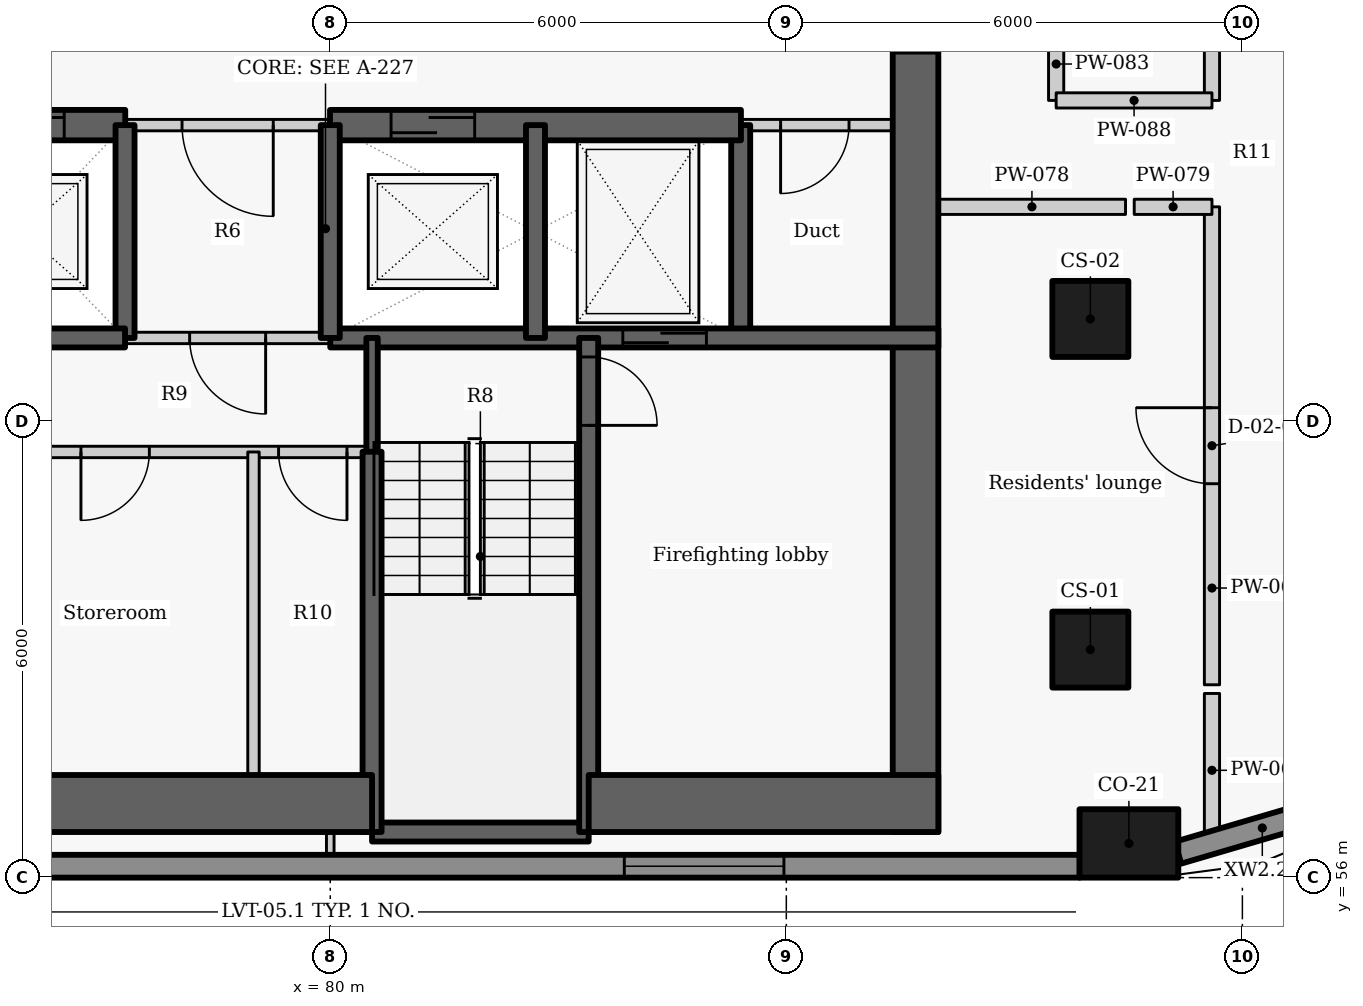
"""IFC4 building model, lengths in metres.
Left out: names, types, materials, properties, quantities, classifications, styles, units other than length and angle.
Written with IfcOpenShell. Run it as: python <this file> out.ifc"""

import sys

from ifc_helpers import new_model, si_unit, direction, frame, frame_2d, origin, origin_2d, place, context, subcontext, project, spatial, rectangle, extrude, element, fill, save


model = new_model("IFC4")
c1 = context("Model", 3, precision=1e-05, world=origin(), true_north=direction((0.0, 1.0)))
c2 = subcontext(c1, "Body", "Model", "MODEL_VIEW")
j1 = project(units=[si_unit("LENGTHUNIT", "METRE"), si_unit("PLANEANGLEUNIT", "RADIAN")], contexts=[c1])
p1 = place(None, origin())
s1 = spatial("IfcSite", under=j1, at=p1, CompositionType="ELEMENT")
p2 = place(p1, origin())
s2 = spatial("IfcBuilding", under=s1, at=p2, CompositionType="ELEMENT")
p3 = place(p2, frame((0.0, 0.0, 150.3)))
s3 = spatial("IfcBuildingStorey", under=s2, at=p3, CompositionType="ELEMENT", Elevation=150.3)
p4 = place(p3, frame((90.507, 56.45, 0.0), z_axis=(0.0, 0.0, 1.0), x_axis=(1.0, 0.0, 0.0)))
e1 = element("IfcColumn", 1, at=p4, inside=s3, PredefinedType="COLUMN", context=c2, shape_type="SweptSolid", body=[
    extrude(rectangle(XDim=1.3, YDim=0.9, at=origin_2d()), origin(), (0.0, 0.0, 1.0), 3.3),
])
for number, where, z_axis, x_axis in (
    (2, (90.0, 59.0, 0.0), (0.0, 0.0, 1.0), (0.0, 1.0, 0.0)),
    (3, (90.0, 63.35, 0.0), (0.0, 0.0, 1.0), (0.0, 1.0, 0.0)),
):
    element("IfcColumn", number, at=place(p3, frame(where, z_axis=z_axis, x_axis=x_axis)), inside=s3, PredefinedType="COLUMN", context=c2, shape_type="SweptSolid", body=[
        extrude(rectangle(XDim=1.0, YDim=1.0, at=origin_2d()), origin(), (0.0, 0.0, 1.0), 3.3),
    ])
p5 = place(p3, frame((69.821, 56.15, 0.0), z_axis=(0.0, 0.0, 1.0), x_axis=(1.0, 0.0, 0.0)))
e4 = element("IfcWall", 4, at=p5, inside=s3, PredefinedType="SOLIDWALL", context=c2, shape_type="SweptSolid", body=[
    extrude(rectangle(XDim=20.04, YDim=0.3, at=frame_2d((10.02, 0.0))), origin(), (0.0, 0.0, 1.0), 2.425),
])
p6 = place(p5, frame((4.051, 0.0, 0.9)))
e5 = element("IfcOpeningElement", 5, at=p6, cuts=e4, PredefinedType="OPENING", context=c2, shape_type="SweptSolid", body=[
    extrude(rectangle(XDim=2.1, YDim=1.1, at=frame_2d((1.05, 0.55))), frame((0.0, 0.16, 0.0), z_axis=(0.0, -1.0, 0.0), x_axis=(1.0, 0.0, 0.0)), (0.0, 0.0, 1.0), 0.32),
])
p7 = place(p5, frame((14.047, 0.0, 0.9)))
e6 = element("IfcOpeningElement", 6, at=p7, cuts=e4, PredefinedType="OPENING", context=c2, shape_type="SweptSolid", body=[
    extrude(rectangle(XDim=2.1, YDim=1.1, at=frame_2d((1.05, 0.55))), frame((0.0, 0.16, 0.0), z_axis=(0.0, -1.0, 0.0), x_axis=(1.0, 0.0, 0.0)), (0.0, 0.0, 1.0), 0.32),
])
p8 = place(p3, frame((91.153, 56.328, 0.0), z_axis=(0.0, 0.0, 1.0), x_axis=(0.959473072336, 0.281800325517, 0.0)))
e7 = element("IfcWall", 7, at=p8, inside=s3, PredefinedType="SOLIDWALL", context=c2, shape_type="SweptSolid", body=[
    extrude(rectangle(XDim=2.312, YDim=0.3, at=frame_2d((1.156, 0.0))), origin(), (0.0, 0.0, 1.0), 2.425),
])
p9 = place(p3, frame((85.4, 63.1, -0.275), z_axis=(0.0, 0.0, 1.0), x_axis=(0.0, 1.0, 0.0)))
e8 = element("IfcWall", 8, at=p9, inside=s3, PredefinedType="SHEAR", context=c2, shape_type="SweptSolid", body=[
    extrude(rectangle(XDim=2.8, YDim=0.25, at=frame_2d((1.4, 0.0))), origin(), (0.0, 0.0, 1.0), 3.3),
])
p10 = place(p3, frame((87.7, 72.2, -0.275), z_axis=(0.0, 0.0, 1.0), x_axis=(0.0, -1.0, 0.0)))
e9 = element("IfcWall", 9, at=p10, inside=s3, PredefinedType="SHEAR", context=c2, shape_type="SweptSolid", body=[
    extrude(rectangle(XDim=15.6, YDim=0.6, at=frame_2d((7.8, 0.0))), origin(), (0.0, 0.0, 1.0), 3.3),
])
p11 = place(p10, frame((3.852, 0.0, 0.275)))
e10 = element("IfcOpeningElement", 10, at=p11, cuts=e9, PredefinedType="OPENING", context=c2, shape_type="SweptSolid", body=[
    extrude(rectangle(XDim=1.5, YDim=2.1, at=frame_2d((0.75, 1.05))), frame((0.0, 0.31, 0.0), z_axis=(0.0, -1.0, 0.0), x_axis=(1.0, 0.0, 0.0)), (0.0, 0.0, 1.0), 0.62),
])
p12 = place(p3, frame((80.003, 65.9, 0.0), z_axis=(0.0, 0.0, 1.0), x_axis=(-1.0, 0.0, 0.0)))
e11 = element("IfcWall", 11, at=p12, inside=s3, PredefinedType="PARTITIONING", context=c2, shape_type="SweptSolid", body=[
    extrude(rectangle(XDim=2.706, YDim=0.15, at=frame_2d((1.353, 0.0))), origin(), (0.0, 0.0, 1.0), 3.025),
])
p13 = place(p12, frame((0.753, 0.0, 0.0)))
e12 = element("IfcOpeningElement", 12, at=p13, cuts=e11, PredefinedType="OPENING", context=c2, shape_type="SweptSolid", body=[
    extrude(rectangle(XDim=1.2, YDim=2.1, at=frame_2d((0.6, 1.05))), frame((0.0, 0.085, 0.0), z_axis=(0.0, -1.0, 0.0), x_axis=(1.0, 0.0, 0.0)), (0.0, 0.0, 1.0), 0.17),
])
p14 = place(p3, frame((88.0, 65.9, 0.0), z_axis=(0.0, 0.0, 1.0), x_axis=(-1.0, 0.0, 0.0)))
e13 = element("IfcWall", 13, at=p14, inside=s3, PredefinedType="PARTITIONING", context=c2, shape_type="SweptSolid", body=[
    extrude(rectangle(XDim=2.603, YDim=0.15, at=frame_2d((1.302, 0.0))), origin(), (0.0, 0.0, 1.0), 3.025),
])
p15 = place(p14, frame((1.175, 0.0, 0.0)))
e14 = element("IfcOpeningElement", 14, at=p15, cuts=e13, PredefinedType="OPENING", context=c2, shape_type="SweptSolid", body=[
    extrude(rectangle(XDim=0.9, YDim=2.1, at=frame_2d((0.45, 1.05))), frame((0.0, 0.085, 0.0), z_axis=(0.0, -1.0, 0.0), x_axis=(1.0, 0.0, 0.0)), (0.0, 0.0, 1.0), 0.17),
])
p16 = place(p3, frame((74.597, 65.9, -0.275), z_axis=(0.0, 0.0, 1.0), x_axis=(1.0, 0.0, 0.0)))
e15 = element("IfcWall", 15, at=p16, inside=s3, PredefinedType="SHEAR", context=c2, shape_type="SweptSolid", body=[
    extrude(rectangle(XDim=2.706, YDim=0.4, at=frame_2d((1.353, 0.0))), origin(), (0.0, 0.0, 1.0), 3.3),
])
p17 = place(p16, frame((0.803, 0.0, 0.275)))
e16 = element("IfcOpeningElement", 16, at=p17, cuts=e15, PredefinedType="OPENING", context=c2, shape_type="SweptSolid", body=[
    extrude(rectangle(XDim=1.1, YDim=2.1, at=frame_2d((0.55, 1.05))), frame((0.0, 0.21, 0.0), z_axis=(0.0, -1.0, 0.0), x_axis=(1.0, 0.0, 0.0)), (0.0, 0.0, 1.0), 0.42),
])
p18 = place(p3, frame((79.997, 65.9, -0.275), z_axis=(0.0, 0.0, 1.0), x_axis=(1.0, 0.0, 0.0)))
e17 = element("IfcWall", 17, at=p18, inside=s3, PredefinedType="SHEAR", context=c2, shape_type="SweptSolid", body=[
    extrude(rectangle(XDim=5.406, YDim=0.4, at=frame_2d((2.703, 0.0))), origin(), (0.0, 0.0, 1.0), 3.3),
])
p19 = place(p18, frame((0.803, 0.0, 0.275)))
e18 = element("IfcOpeningElement", 18, at=p19, cuts=e17, PredefinedType="OPENING", context=c2, shape_type="SweptSolid", body=[
    extrude(rectangle(XDim=1.1, YDim=2.1, at=frame_2d((0.55, 1.05))), frame((0.0, 0.21, 0.0), z_axis=(0.0, -1.0, 0.0), x_axis=(1.0, 0.0, 0.0)), (0.0, 0.0, 1.0), 0.42),
])
p20 = place(p3, frame((77.3, 63.1, -0.275), z_axis=(0.0, 0.0, 1.0), x_axis=(0.0, 1.0, 0.0)))
e19 = element("IfcWall", 19, at=p20, inside=s3, PredefinedType="SHEAR", context=c2, shape_type="SweptSolid", body=[
    extrude(rectangle(XDim=2.8, YDim=0.25, at=frame_2d((1.4, 0.0))), origin(), (0.0, 0.0, 1.0), 3.3),
])
p21 = place(p3, frame((74.6, 63.1, -0.275), z_axis=(0.0, 0.0, 1.0), x_axis=(1.0, 0.0, 0.0)))
e20 = element("IfcWall", 20, at=p21, inside=s3, PredefinedType="SHEAR", context=c2, shape_type="SweptSolid", body=[
    extrude(rectangle(XDim=2.7, YDim=0.25, at=frame_2d((1.35, 0.0))), origin(), (0.0, 0.0, 1.0), 3.3),
])
p22 = place(p3, frame((80.0, 63.1, -0.275), z_axis=(0.0, 0.0, 1.0), x_axis=(1.0, 0.0, 0.0)))
e21 = element("IfcWall", 21, at=p22, inside=s3, PredefinedType="SHEAR", context=c2, shape_type="SweptSolid", body=[
    extrude(rectangle(XDim=8.0, YDim=0.25, at=frame_2d((4.0, 0.0))), origin(), (0.0, 0.0, 1.0), 3.3),
])
p23 = place(p22, frame((3.849, 0.0, 0.275)))
e22 = element("IfcOpeningElement", 22, at=p23, cuts=e21, PredefinedType="OPENING", context=c2, shape_type="SweptSolid", body=[
    extrude(rectangle(XDim=1.1, YDim=2.1, at=frame_2d((0.55, 1.05))), frame((0.0, 0.135, 0.0), z_axis=(0.0, -1.0, 0.0), x_axis=(1.0, 0.0, 0.0)), (0.0, 0.0, 1.0), 0.27),
])
p24 = place(p3, frame((80.0, 63.1, -0.275), z_axis=(0.0, 0.0, 1.0), x_axis=(0.0, 1.0, 0.0)))
e23 = element("IfcWall", 23, at=p24, inside=s3, PredefinedType="SHEAR", context=c2, shape_type="SweptSolid", body=[
    extrude(rectangle(XDim=2.8, YDim=0.25, at=frame_2d((1.4, 0.0))), origin(), (0.0, 0.0, 1.0), 3.3),
])
p25 = place(p3, frame((80.0, 63.1, 0.0), z_axis=(0.0, 0.0, 1.0), x_axis=(-1.0, 0.0, 0.0)))
e24 = element("IfcWall", 24, at=p25, inside=s3, PredefinedType="PARTITIONING", context=c2, shape_type="SweptSolid", body=[
    extrude(rectangle(XDim=2.7, YDim=0.15, at=frame_2d((1.35, 0.0))), origin(), (0.0, 0.0, 1.0), 3.025),
])
p26 = place(p25, frame((0.85, 0.0, 0.0)))
e25 = element("IfcOpeningElement", 25, at=p26, cuts=e24, PredefinedType="OPENING", context=c2, shape_type="SweptSolid", body=[
    extrude(rectangle(XDim=1.0, YDim=2.1, at=frame_2d((0.5, 1.05))), frame((0.0, 0.085, 0.0), z_axis=(0.0, -1.0, 0.0), x_axis=(1.0, 0.0, 0.0)), (0.0, 0.0, 1.0), 0.17),
])
p27 = place(p3, frame((82.7, 63.1, -0.275), z_axis=(0.0, 0.0, 1.0), x_axis=(0.0, 1.0, 0.0)))
e26 = element("IfcWall", 26, at=p27, inside=s3, PredefinedType="SHEAR", context=c2, shape_type="SweptSolid", body=[
    extrude(rectangle(XDim=2.8, YDim=0.25, at=frame_2d((1.4, 0.0))), origin(), (0.0, 0.0, 1.0), 3.3),
])
p28 = place(p3, frame((80.55, 56.6, -0.275), z_axis=(0.0, 0.0, 1.0), x_axis=(1.0, 0.0, 0.0)))
e27 = element("IfcWall", 27, at=p28, inside=s3, PredefinedType="SHEAR", context=c2, shape_type="SweptSolid", body=[
    extrude(rectangle(XDim=2.85, YDim=0.25, at=frame_2d((1.425, 0.0))), origin(), (0.0, 0.0, 1.0), 3.3),
])
p29 = place(p3, frame((83.4, 63.1, -0.275), z_axis=(0.0, 0.0, 1.0), x_axis=(0.0, -1.0, 0.0)))
e28 = element("IfcWall", 28, at=p29, inside=s3, PredefinedType="SHEAR", context=c2, shape_type="SweptSolid", body=[
    extrude(rectangle(XDim=6.5, YDim=0.25, at=frame_2d((3.25, 0.0))), origin(), (0.0, 0.0, 1.0), 3.3),
])
p30 = place(p29, frame((0.25, 0.0, 0.275)))
e29 = element("IfcOpeningElement", 29, at=p30, cuts=e28, PredefinedType="OPENING", context=c2, shape_type="SweptSolid", body=[
    extrude(rectangle(XDim=0.9, YDim=2.1, at=frame_2d((0.45, 1.05))), frame((0.0, 0.135, 0.0), z_axis=(0.0, -1.0, 0.0), x_axis=(1.0, 0.0, 0.0)), (0.0, 0.0, 1.0), 0.27),
])
p31 = place(p3, frame((80.55, 61.597, -0.275), z_axis=(0.0, 0.0, 1.0), x_axis=(0.0, 1.0, 0.0)))
e30 = element("IfcWall", 30, at=p31, inside=s3, PredefinedType="SHEAR", context=c2, shape_type="SweptSolid", body=[
    extrude(rectangle(XDim=1.503, YDim=0.15, at=frame_2d((0.751, 0.0))), origin(), (0.0, 0.0, 1.0), 3.3),
])
p32 = place(p3, frame((80.55, 56.6, -0.275), z_axis=(0.0, 0.0, 1.0), x_axis=(0.0, 1.0, 0.0)))
e31 = element("IfcWall", 31, at=p32, inside=s3, PredefinedType="SHEAR", context=c2, shape_type="SweptSolid", body=[
    extrude(rectangle(XDim=5.003, YDim=0.25, at=frame_2d((2.501, 0.0))), origin(), (0.0, 0.0, 1.0), 3.3),
])
p33 = place(p3, frame((75.35, 56.975, -0.275), z_axis=(0.0, 0.0, 1.0), x_axis=(1.0, 0.0, 0.0)))
e32 = element("IfcWall", 32, at=p33, inside=s3, PredefinedType="SHEAR", context=c2, shape_type="SweptSolid", body=[
    extrude(rectangle(XDim=5.2, YDim=0.75, at=frame_2d((2.6, 0.0))), origin(), (0.0, 0.0, 1.0), 3.3),
])
p34 = place(p3, frame((83.4, 56.975, -0.275), z_axis=(0.0, 0.0, 1.0), x_axis=(1.0, 0.0, 0.0)))
e33 = element("IfcWall", 33, at=p34, inside=s3, PredefinedType="SHEAR", context=c2, shape_type="SweptSolid", body=[
    extrude(rectangle(XDim=4.6, YDim=0.75, at=frame_2d((2.3, 0.0))), origin(), (0.0, 0.0, 1.0), 3.3),
])
p35 = place(p3, frame((80.55, 61.6, 0.0), z_axis=(0.0, 0.0, 1.0), x_axis=(-1.0, 0.0, 0.0)))
e34 = element("IfcWall", 34, at=p35, inside=s3, PredefinedType="PARTITIONING", context=c2, shape_type="SweptSolid", body=[
    extrude(rectangle(XDim=5.2, YDim=0.15, at=frame_2d((2.6, 0.0))), origin(), (0.0, 0.0, 1.0), 3.025),
])
p36 = place(p35, frame((2.93, 0.0, 0.0)))
e35 = element("IfcOpeningElement", 35, at=p36, cuts=e34, PredefinedType="OPENING", context=c2, shape_type="SweptSolid", body=[
    extrude(rectangle(XDim=0.9, YDim=2.1, at=frame_2d((0.45, 1.05))), frame((0.0, 0.085, 0.0), z_axis=(0.0, -1.0, 0.0), x_axis=(1.0, 0.0, 0.0)), (0.0, 0.0, 1.0), 0.17),
])
p37 = place(p35, frame((0.33, 0.0, 0.0)))
e36 = element("IfcOpeningElement", 36, at=p37, cuts=e34, PredefinedType="OPENING", context=c2, shape_type="SweptSolid", body=[
    extrude(rectangle(XDim=0.9, YDim=2.1, at=frame_2d((0.45, 1.05))), frame((0.0, 0.085, 0.0), z_axis=(0.0, -1.0, 0.0), x_axis=(1.0, 0.0, 0.0)), (0.0, 0.0, 1.0), 0.17),
])
p38 = place(p3, frame((78.99, 56.6, 0.0), z_axis=(0.0, 0.0, 1.0), x_axis=(0.0, 1.0, 0.0)))
e37 = element("IfcWall", 37, at=p38, inside=s3, PredefinedType="PARTITIONING", context=c2, shape_type="SweptSolid", body=[
    extrude(rectangle(XDim=5.0, YDim=0.15, at=frame_2d((2.5, 0.0))), origin(), (0.0, 0.0, 1.0), 3.025),
])
p39 = place(p3, frame((91.6, 56.401, 0.0), z_axis=(0.0, 0.0, 1.0), x_axis=(0.0, 1.0, 0.0)))
e38 = element("IfcWall", 38, at=p39, inside=s3, PredefinedType="PARTITIONING", context=c2, shape_type="SweptSolid", body=[
    extrude(rectangle(XDim=2.022, YDim=0.2, at=frame_2d((1.011, 0.0))), origin(), (0.0, 0.0, 1.0), 2.405),
])
p40 = place(p3, frame((91.6, 58.537, 0.0), z_axis=(0.0, 0.0, 1.0), x_axis=(0.0, 1.0, 0.0)))
e39 = element("IfcWall", 39, at=p40, inside=s3, PredefinedType="PARTITIONING", context=c2, shape_type="SweptSolid", body=[
    extrude(rectangle(XDim=6.288, YDim=0.2, at=frame_2d((3.144, 0.0))), origin(), (0.0, 0.0, 1.0), 3.025),
])
p41 = place(p40, frame((2.645, 0.0, 0.0)))
e40 = element("IfcOpeningElement", 40, at=p41, cuts=e39, PredefinedType="OPENING", context=c2, shape_type="SweptSolid", body=[
    extrude(rectangle(XDim=1.0, YDim=2.1, at=frame_2d((0.5, 1.05))), frame((0.0, 0.11, 0.0), z_axis=(0.0, -1.0, 0.0), x_axis=(1.0, 0.0, 0.0)), (0.0, 0.0, 1.0), 0.22),
])
p42 = place(p3, frame((91.6, 66.225, 0.0), z_axis=(0.0, 0.0, 1.0), x_axis=(0.0, 1.0, 0.0)))
e41 = element("IfcWall", 41, at=p42, inside=s3, PredefinedType="PARTITIONING", context=c2, shape_type="SweptSolid", body=[
    extrude(rectangle(XDim=5.248, YDim=0.2, at=frame_2d((2.624, 0.0))), origin(), (0.0, 0.0, 1.0), 3.025),
])
p43 = place(p42, frame((2.123, 0.0, 0.0)))
e42 = element("IfcOpeningElement", 42, at=p43, cuts=e41, PredefinedType="OPENING", context=c2, shape_type="SweptSolid", body=[
    extrude(rectangle(XDim=1.0, YDim=2.1, at=frame_2d((0.5, 1.05))), frame((0.0, 0.11, 0.0), z_axis=(0.0, -1.0, 0.0), x_axis=(1.0, 0.0, 0.0)), (0.0, 0.0, 1.0), 0.22),
])
p44 = place(p3, frame((88.0, 64.825, 0.0), z_axis=(0.0, 0.0, 1.0), x_axis=(1.0, 0.0, 0.0)))
e43 = element("IfcWall", 43, at=p44, inside=s3, PredefinedType="PARTITIONING", context=c2, shape_type="SweptSolid", body=[
    extrude(rectangle(XDim=2.463, YDim=0.2, at=frame_2d((1.231, 0.0))), origin(), (0.0, 0.0, 1.0), 2.505),
])
p45 = place(p3, frame((90.577, 64.825, 0.0), z_axis=(0.0, 0.0, 1.0), x_axis=(1.0, 0.0, 0.0)))
e44 = element("IfcWall", 44, at=p45, inside=s3, PredefinedType="PARTITIONING", context=c2, shape_type="SweptSolid", body=[
    extrude(rectangle(XDim=1.023, YDim=0.2, at=frame_2d((0.511, 0.0))), origin(), (0.0, 0.0, 1.0), 3.025),
])
p46 = place(p3, frame((89.55, 66.225, 0.0), z_axis=(0.0, 0.0, 1.0), x_axis=(0.0, 1.0, 0.0)))
e45 = element("IfcWall", 45, at=p46, inside=s3, PredefinedType="PARTITIONING", context=c2, shape_type="SweptSolid", body=[
    extrude(rectangle(XDim=0.958, YDim=0.2, at=frame_2d((0.479, 0.0))), origin(), (0.0, 0.0, 1.0), 3.025),
])
p47 = place(p3, frame((89.55, 66.225, 0.0), z_axis=(0.0, 0.0, 1.0), x_axis=(1.0, 0.0, 0.0)))
e46 = element("IfcWall", 46, at=p47, inside=s3, PredefinedType="PARTITIONING", context=c2, shape_type="SweptSolid", body=[
    extrude(rectangle(XDim=2.05, YDim=0.2, at=frame_2d((1.025, 0.0))), origin(), (0.0, 0.0, 1.0), 2.505),
])
p48 = place(p3, frame((80.0, 56.3, 0.0), z_axis=(0.0, 0.0, 1.0), x_axis=(0.0, 1.0, 0.0)))
e47 = element("IfcWall", 47, at=p48, inside=s3, PredefinedType="PARTITIONING", context=c2, shape_type="SweptSolid", body=[
    extrude(rectangle(XDim=0.3, YDim=0.1, at=frame_2d((0.15, 0.0))), origin(), (0.0, 0.0, 1.0), 3.025),
])
p49 = place(p7, origin())
e48 = element("IfcWindow", 48, at=p49, inside=s3, PartitioningType="SINGLE_PANEL", PredefinedType="WINDOW", context=c2, shape_type="SweptSolid", body=[
    extrude(rectangle(XDim=2.1, YDim=1.1, at=frame_2d((1.05, 0.55))), frame((0.0, 0.03, 0.0), z_axis=(0.0, -1.0, 0.0), x_axis=(1.0, 0.0, 0.0)), (0.0, 0.0, 1.0), 0.06),
])
fill(e6, e48)
p50 = place(p17, origin())
e49 = element("IfcDoor", 49, at=p50, inside=s3, OperationType="SLIDING_TO_LEFT", PredefinedType="DOOR", context=c2, shape_type="SweptSolid", body=[
    extrude(rectangle(XDim=1.1, YDim=2.1, at=frame_2d((0.55, 1.05))), frame((0.0, 0.025, 0.0), z_axis=(0.0, -1.0, 0.0), x_axis=(1.0, 0.0, 0.0)), (0.0, 0.0, 1.0), 0.05),
])
fill(e16, e49)
p51 = place(p13, origin())
e50 = element("IfcDoor", 50, at=p51, inside=s3, OperationType="DOUBLE_DOOR_SINGLE_SWING", PredefinedType="DOOR", context=c2, shape_type="SweptSolid", body=[
    extrude(rectangle(XDim=1.2, YDim=2.1, at=frame_2d((0.6, 1.05))), frame((0.0, 0.025, 0.0), z_axis=(0.0, -1.0, 0.0), x_axis=(1.0, 0.0, 0.0)), (0.0, 0.0, 1.0), 0.05),
])
fill(e12, e50)
p52 = place(p19, origin())
e51 = element("IfcDoor", 51, at=p52, inside=s3, OperationType="SLIDING_TO_LEFT", PredefinedType="DOOR", context=c2, shape_type="SweptSolid", body=[
    extrude(rectangle(XDim=1.1, YDim=2.1, at=frame_2d((0.55, 1.05))), frame((0.0, 0.025, 0.0), z_axis=(0.0, -1.0, 0.0), x_axis=(1.0, 0.0, 0.0)), (0.0, 0.0, 1.0), 0.05),
])
fill(e18, e51)
p53 = place(p23, origin())
e52 = element("IfcDoor", 52, at=p53, inside=s3, OperationType="SLIDING_TO_LEFT", PredefinedType="DOOR", context=c2, shape_type="SweptSolid", body=[
    extrude(rectangle(XDim=1.1, YDim=2.1, at=frame_2d((0.55, 1.05))), frame((0.0, 0.025, 0.0), z_axis=(0.0, -1.0, 0.0), x_axis=(1.0, 0.0, 0.0)), (0.0, 0.0, 1.0), 0.05),
])
fill(e22, e52)
p54 = place(p15, origin())
e53 = element("IfcDoor", 53, at=p54, inside=s3, OperationType="SINGLE_SWING_RIGHT", PredefinedType="DOOR", context=c2, shape_type="SweptSolid", body=[
    extrude(rectangle(XDim=0.9, YDim=2.1, at=frame_2d((0.45, 1.05))), frame((0.0, 0.025, 0.0), z_axis=(0.0, -1.0, 0.0), x_axis=(1.0, 0.0, 0.0)), (0.0, 0.0, 1.0), 0.05),
])
fill(e14, e53)
p55 = place(p26, origin())
e54 = element("IfcDoor", 54, at=p55, inside=s3, OperationType="SINGLE_SWING_LEFT", PredefinedType="DOOR", context=c2, shape_type="SweptSolid", body=[
    extrude(rectangle(XDim=1.0, YDim=2.1, at=frame_2d((0.5, 1.05))), frame((0.0, 0.025, 0.0), z_axis=(0.0, -1.0, 0.0), x_axis=(1.0, 0.0, 0.0)), (0.0, 0.0, 1.0), 0.05),
])
fill(e25, e54)
p56 = place(p36, origin())
e55 = element("IfcDoor", 55, at=p56, inside=s3, OperationType="SINGLE_SWING_RIGHT", PredefinedType="DOOR", context=c2, shape_type="SweptSolid", body=[
    extrude(rectangle(XDim=0.9, YDim=2.1, at=frame_2d((0.45, 1.05))), frame((0.0, 0.025, 0.0), z_axis=(0.0, -1.0, 0.0), x_axis=(1.0, 0.0, 0.0)), (0.0, 0.0, 1.0), 0.05),
])
fill(e35, e55)
p57 = place(p37, origin())
e56 = element("IfcDoor", 56, at=p57, inside=s3, OperationType="SINGLE_SWING_LEFT", PredefinedType="DOOR", context=c2, shape_type="SweptSolid", body=[
    extrude(rectangle(XDim=0.9, YDim=2.1, at=frame_2d((0.45, 1.05))), frame((0.0, 0.025, 0.0), z_axis=(0.0, -1.0, 0.0), x_axis=(1.0, 0.0, 0.0)), (0.0, 0.0, 1.0), 0.05),
])
fill(e36, e56)
p58 = place(p30, origin())
e57 = element("IfcDoor", 57, at=p58, inside=s3, OperationType="SINGLE_SWING_RIGHT", PredefinedType="DOOR", context=c2, shape_type="SweptSolid", body=[
    extrude(rectangle(XDim=0.9, YDim=2.1, at=frame_2d((0.45, 1.05))), frame((0.0, 0.025, 0.0), z_axis=(0.0, -1.0, 0.0), x_axis=(1.0, 0.0, 0.0)), (0.0, 0.0, 1.0), 0.05),
])
fill(e29, e57)
p59 = place(p41, origin())
e58 = element("IfcDoor", 58, at=p59, inside=s3, OperationType="SINGLE_SWING_RIGHT", PredefinedType="DOOR", context=c2, shape_type="SweptSolid", body=[
    extrude(rectangle(XDim=1.0, YDim=2.1, at=frame_2d((0.5, 1.05))), frame((0.0, 0.025, 0.0), z_axis=(0.0, -1.0, 0.0), x_axis=(1.0, 0.0, 0.0)), (0.0, 0.0, 1.0), 0.05),
])
fill(e40, e58)
p60 = place(p11, origin())
e59 = element("IfcDoor", 59, at=p60, inside=s3, OperationType="DOUBLE_DOOR_SINGLE_SWING", PredefinedType="DOOR", context=c2, shape_type="SweptSolid", body=[
    extrude(rectangle(XDim=1.5, YDim=2.1, at=frame_2d((0.75, 1.05))), frame((0.0, 0.025, 0.0), z_axis=(0.0, -1.0, 0.0), x_axis=(1.0, 0.0, 0.0)), (0.0, 0.0, 1.0), 0.05),
])
fill(e10, e59)
save(model, sys.argv[1])
